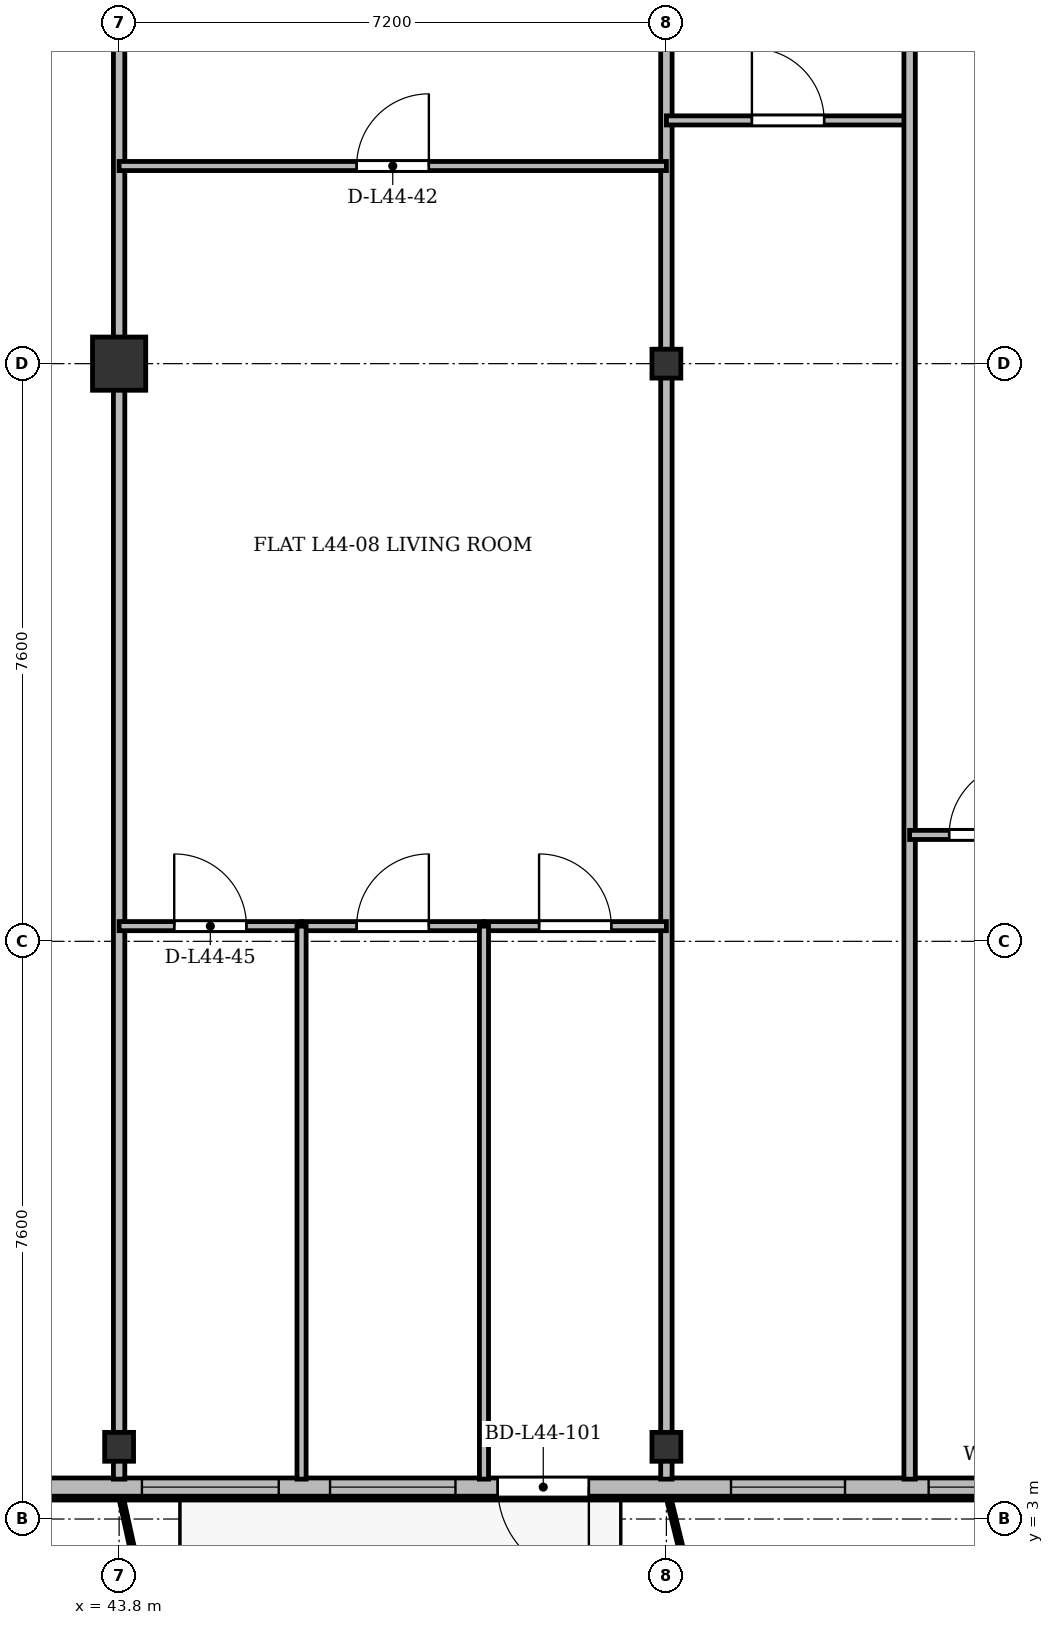
"""IFC4 building model, lengths in metres.
Left out: names, types, materials, properties, quantities, classifications, styles, units other than length and angle.
Written with IfcOpenShell. Run it as: python <this file> out.ifc"""

import sys

from ifc_helpers import new_model, si_unit, direction, frame, frame_2d, origin, origin_2d, place, context, subcontext, project, spatial, rectangle, i_section, extrude, source, transform, mapped, element, fill, save


model = new_model("IFC4")
c1 = context("Model", 3, precision=1e-05, world=origin(), true_north=direction((0.0, 1.0)))
c2 = subcontext(c1, "Body", "Model", "MODEL_VIEW")
j1 = project(units=[si_unit("LENGTHUNIT", "METRE"), si_unit("PLANEANGLEUNIT", "RADIAN")], contexts=[c1])
p1 = place(None, origin())
s1 = spatial("IfcSite", under=j1, at=p1, CompositionType="ELEMENT")
p2 = place(p1, origin())
s2 = spatial("IfcBuilding", under=s1, at=p2, CompositionType="ELEMENT")
p3 = place(p2, frame((0.0, 0.0, 168.1)))
s3 = spatial("IfcBuildingStorey", under=s2, at=p3, CompositionType="ELEMENT", Elevation=168.1)
m1 = source(origin(), c2, "Body", "SweptSolid", [
    extrude(i_section(OverallWidth=0.38, OverallDepth=0.38, WebThickness=0.02, FlangeThickness=0.03, at=origin_2d()), origin(), (0.0, 0.0, 1.0), 3.6),
])
p4 = place(p3, frame((43.8, 3.95, 0.0), z_axis=(0.0, 0.0, 1.0), x_axis=(1.0, 0.0, 0.0)))
e1 = element("IfcColumn", 1, at=p4, inside=s3, PredefinedType="COLUMN", context=c2, shape_type="MappedRepresentation", body=[
    mapped(m1, transform((0.0, 0.0, 0.0), x_axis=(1.0, 0.0, 0.0), y_axis=(0.0, 1.0, 0.0), z_axis=(0.0, 0.0, 1.0), scale=1.0)),
])
m2 = source(origin(), c2, "Body", "SweptSolid", [
    extrude(rectangle(XDim=0.7, YDim=0.7, at=origin_2d()), origin(), (0.0, 0.0, 1.0), 3.6),
])
p5 = place(p3, frame((43.8, 18.2, 0.0), z_axis=(0.0, 0.0, 1.0), x_axis=(1.0, 0.0, 0.0)))
e2 = element("IfcColumn", 2, at=p5, inside=s3, PredefinedType="COLUMN", context=c2, shape_type="MappedRepresentation", body=[
    mapped(m2, transform((0.0, 0.0, 0.0), x_axis=(1.0, 0.0, 0.0), y_axis=(0.0, 1.0, 0.0), z_axis=(0.0, 0.0, 1.0), scale=1.0)),
])
for number, where, z_axis, x_axis in (
    (3, (51.0, 3.95, 0.0), (0.0, 0.0, 1.0), (1.0, 0.0, 0.0)),
    (4, (51.0, 18.2, 0.0), (0.0, 0.0, 1.0), (1.0, 0.0, 0.0)),
):
    element("IfcColumn", number, at=place(p3, frame(where, z_axis=z_axis, x_axis=x_axis)), inside=s3, PredefinedType="COLUMN", context=c2, shape_type="MappedRepresentation", body=[
        mapped(m1, transform((0.0, 0.0, 0.0), x_axis=(1.0, 0.0, 0.0), y_axis=(0.0, 1.0, 0.0), z_axis=(0.0, 0.0, 1.0), scale=1.0)),
    ])
p6 = place(p3, frame((63.6, 3.42, 0.0), z_axis=(0.0, 0.0, 1.0), x_axis=(-1.0, 0.0, 0.0)))
e5 = element("IfcWall", 5, at=p6, inside=s3, PredefinedType="SOLIDWALL", context=c2, shape_type="SweptSolid", body=[
    extrude(rectangle(XDim=52.8, YDim=0.24, at=frame_2d((26.4, 0.0))), origin(), (0.0, 0.0, 1.0), 3.35),
])
p7 = place(p6, frame((1.62, 0.0, 0.9)))
e6 = element("IfcOpeningElement", 6, at=p7, cuts=e5, PredefinedType="OPENING", context=c2, shape_type="SweptSolid", body=[
    extrude(rectangle(XDim=1.65, YDim=1.85, at=frame_2d((0.825, 0.925))), frame((0.0, 0.13, 0.0), z_axis=(0.0, -1.0, 0.0), x_axis=(1.0, 0.0, 0.0)), (0.0, 0.0, 1.0), 0.26),
])
p8 = place(p6, frame((5.2, 0.0, 0.9)))
e7 = element("IfcOpeningElement", 7, at=p8, cuts=e5, PredefinedType="OPENING", context=c2, shape_type="SweptSolid", body=[
    extrude(rectangle(XDim=1.8, YDim=1.8, at=frame_2d((0.9, 0.9))), frame((0.0, 0.13, 0.0), z_axis=(0.0, -1.0, 0.0), x_axis=(1.0, 0.0, 0.0)), (0.0, 0.0, 1.0), 0.26),
])
p9 = place(p6, frame((7.65, 0.0, 0.9)))
e8 = element("IfcOpeningElement", 8, at=p9, cuts=e5, PredefinedType="OPENING", context=c2, shape_type="SweptSolid", body=[
    extrude(rectangle(XDim=1.5, YDim=1.75, at=frame_2d((0.75, 0.875))), frame((0.0, 0.13, 0.0), z_axis=(0.0, -1.0, 0.0), x_axis=(1.0, 0.0, 0.0)), (0.0, 0.0, 1.0), 0.26),
])
p10 = place(p6, frame((10.25, 0.0, 0.9)))
e9 = element("IfcOpeningElement", 9, at=p10, cuts=e5, PredefinedType="OPENING", context=c2, shape_type="SweptSolid", body=[
    extrude(rectangle(XDim=1.5, YDim=1.75, at=frame_2d((0.75, 0.875))), frame((0.0, 0.13, 0.0), z_axis=(0.0, -1.0, 0.0), x_axis=(1.0, 0.0, 0.0)), (0.0, 0.0, 1.0), 0.26),
])
p11 = place(p6, frame((13.62, 0.0, 0.0)))
e10 = element("IfcOpeningElement", 10, at=p11, cuts=e5, PredefinedType="OPENING", context=c2, shape_type="SweptSolid", body=[
    extrude(rectangle(XDim=1.2, YDim=2.2, at=frame_2d((0.6, 1.1))), frame((0.0, 0.13, 0.0), z_axis=(0.0, -1.0, 0.0), x_axis=(1.0, 0.0, 0.0)), (0.0, 0.0, 1.0), 0.26),
])
p12 = place(p6, frame((15.375, 0.0, 0.9)))
e11 = element("IfcOpeningElement", 11, at=p12, cuts=e5, PredefinedType="OPENING", context=c2, shape_type="SweptSolid", body=[
    extrude(rectangle(XDim=1.65, YDim=1.85, at=frame_2d((0.825, 0.925))), frame((0.0, 0.13, 0.0), z_axis=(0.0, -1.0, 0.0), x_axis=(1.0, 0.0, 0.0)), (0.0, 0.0, 1.0), 0.26),
])
p13 = place(p6, frame((17.7, 0.0, 0.9)))
e12 = element("IfcOpeningElement", 12, at=p13, cuts=e5, PredefinedType="OPENING", context=c2, shape_type="SweptSolid", body=[
    extrude(rectangle(XDim=1.8, YDim=1.8, at=frame_2d((0.9, 0.9))), frame((0.0, 0.13, 0.0), z_axis=(0.0, -1.0, 0.0), x_axis=(1.0, 0.0, 0.0)), (0.0, 0.0, 1.0), 0.26),
])
p14 = place(p6, frame((22.0, 0.0, 0.9)))
e13 = element("IfcOpeningElement", 13, at=p14, cuts=e5, PredefinedType="OPENING", context=c2, shape_type="SweptSolid", body=[
    extrude(rectangle(XDim=2.2, YDim=1.8, at=frame_2d((1.1, 0.9))), frame((0.0, 0.13, 0.0), z_axis=(0.0, -1.0, 0.0), x_axis=(1.0, 0.0, 0.0)), (0.0, 0.0, 1.0), 0.26),
])
p15 = place(p6, frame((28.95, 0.0, 0.9)))
e14 = element("IfcOpeningElement", 14, at=p15, cuts=e5, PredefinedType="OPENING", context=c2, shape_type="SweptSolid", body=[
    extrude(rectangle(XDim=1.5, YDim=1.75, at=frame_2d((0.75, 0.875))), frame((0.0, 0.13, 0.0), z_axis=(0.0, -1.0, 0.0), x_axis=(1.0, 0.0, 0.0)), (0.0, 0.0, 1.0), 0.26),
])
p16 = place(p6, frame((35.6, 0.0, 0.9)))
e15 = element("IfcOpeningElement", 15, at=p16, cuts=e5, PredefinedType="OPENING", context=c2, shape_type="SweptSolid", body=[
    extrude(rectangle(XDim=2.0, YDim=1.95, at=frame_2d((1.0, 0.975))), frame((0.0, 0.13, 0.0), z_axis=(0.0, -1.0, 0.0), x_axis=(1.0, 0.0, 0.0)), (0.0, 0.0, 1.0), 0.26),
])
p17 = place(p6, frame((41.656, 0.0, 0.0)))
e16 = element("IfcOpeningElement", 16, at=p17, cuts=e5, PredefinedType="OPENING", context=c2, shape_type="SweptSolid", body=[
    extrude(rectangle(XDim=1.2, YDim=2.2, at=frame_2d((0.6, 1.1))), frame((0.0, 0.13, 0.0), z_axis=(0.0, -1.0, 0.0), x_axis=(1.0, 0.0, 0.0)), (0.0, 0.0, 1.0), 0.26),
])
p18 = place(p6, frame((43.65, 0.0, 0.9)))
e17 = element("IfcOpeningElement", 17, at=p18, cuts=e5, PredefinedType="OPENING", context=c2, shape_type="SweptSolid", body=[
    extrude(rectangle(XDim=1.5, YDim=1.75, at=frame_2d((0.75, 0.875))), frame((0.0, 0.13, 0.0), z_axis=(0.0, -1.0, 0.0), x_axis=(1.0, 0.0, 0.0)), (0.0, 0.0, 1.0), 0.26),
])
p19 = place(p6, frame((45.95, 0.0, 0.9)))
e18 = element("IfcOpeningElement", 18, at=p19, cuts=e5, PredefinedType="OPENING", context=c2, shape_type="SweptSolid", body=[
    extrude(rectangle(XDim=1.5, YDim=1.75, at=frame_2d((0.75, 0.875))), frame((0.0, 0.13, 0.0), z_axis=(0.0, -1.0, 0.0), x_axis=(1.0, 0.0, 0.0)), (0.0, 0.0, 1.0), 0.26),
])
p20 = place(p6, frame((49.605, 0.0, 0.9)))
e19 = element("IfcOpeningElement", 19, at=p20, cuts=e5, PredefinedType="OPENING", context=c2, shape_type="SweptSolid", body=[
    extrude(rectangle(XDim=1.5, YDim=1.75, at=frame_2d((0.75, 0.875))), frame((0.0, 0.13, 0.0), z_axis=(0.0, -1.0, 0.0), x_axis=(1.0, 0.0, 0.0)), (0.0, 0.0, 1.0), 0.26),
])
for number, where, z_axis, x_axis in (
    (20, (43.8, 3.525, 0.0), (0.0, 0.0, 1.0), (0.0, 1.0, 0.0)),
    (21, (51.0, 3.525, 0.0), (0.0, 0.0, 1.0), (0.0, 1.0, 0.0)),
):
    element("IfcWall", number, at=place(p3, frame(where, z_axis=z_axis, x_axis=x_axis)), inside=s3, PredefinedType="PARTITIONING", context=c2, shape_type="SweptSolid", body=[
        extrude(rectangle(XDim=27.275, YDim=0.15, at=frame_2d((13.638, 0.0))), origin(), (0.0, 0.0, 1.0), 2.85),
    ])
p21 = place(p3, frame((43.8, 20.8, 0.0), z_axis=(0.0, 0.0, 1.0), x_axis=(1.0, 0.0, 0.0)))
e22 = element("IfcWall", 22, at=p21, inside=s3, PredefinedType="PARTITIONING", context=c2, shape_type="SweptSolid", body=[
    extrude(rectangle(XDim=7.2, YDim=0.12, at=frame_2d((3.6, 0.0))), origin(), (0.0, 0.0, 1.0), 2.85),
])
p22 = place(p21, frame((3.125, 0.0, 0.0)))
e23 = element("IfcOpeningElement", 23, at=p22, cuts=e22, PredefinedType="OPENING", context=c2, shape_type="SweptSolid", body=[
    extrude(rectangle(XDim=0.95, YDim=2.15, at=frame_2d((0.475, 1.075))), frame((0.0, 0.07, 0.0), z_axis=(0.0, -1.0, 0.0), x_axis=(1.0, 0.0, 0.0)), (0.0, 0.0, 1.0), 0.14),
])
p23 = place(p3, frame((43.8, 10.8, 0.0), z_axis=(0.0, 0.0, 1.0), x_axis=(1.0, 0.0, 0.0)))
e24 = element("IfcWall", 24, at=p23, inside=s3, PredefinedType="PARTITIONING", context=c2, shape_type="SweptSolid", body=[
    extrude(rectangle(XDim=2.4, YDim=0.12, at=frame_2d((1.2, 0.0))), origin(), (0.0, 0.0, 1.0), 2.85),
])
p24 = place(p23, frame((0.725, 0.0, 0.0)))
e25 = element("IfcOpeningElement", 25, at=p24, cuts=e24, PredefinedType="OPENING", context=c2, shape_type="SweptSolid", body=[
    extrude(rectangle(XDim=0.95, YDim=2.15, at=frame_2d((0.475, 1.075))), frame((0.0, 0.07, 0.0), z_axis=(0.0, -1.0, 0.0), x_axis=(1.0, 0.0, 0.0)), (0.0, 0.0, 1.0), 0.14),
])
p25 = place(p3, frame((46.2, 10.8, 0.0), z_axis=(0.0, 0.0, 1.0), x_axis=(1.0, 0.0, 0.0)))
e26 = element("IfcWall", 26, at=p25, inside=s3, PredefinedType="PARTITIONING", context=c2, shape_type="SweptSolid", body=[
    extrude(rectangle(XDim=2.4, YDim=0.12, at=frame_2d((1.2, 0.0))), origin(), (0.0, 0.0, 1.0), 3.0),
])
p26 = place(p25, frame((0.725, 0.0, 0.0)))
e27 = element("IfcOpeningElement", 27, at=p26, cuts=e26, PredefinedType="OPENING", context=c2, shape_type="SweptSolid", body=[
    extrude(rectangle(XDim=0.95, YDim=2.15, at=frame_2d((0.475, 1.075))), frame((0.0, 0.07, 0.0), z_axis=(0.0, -1.0, 0.0), x_axis=(1.0, 0.0, 0.0)), (0.0, 0.0, 1.0), 0.14),
])
p27 = place(p3, frame((46.2, 3.525, 0.0), z_axis=(0.0, 0.0, 1.0), x_axis=(0.0, 1.0, 0.0)))
e28 = element("IfcWall", 28, at=p27, inside=s3, PredefinedType="PARTITIONING", context=c2, shape_type="SweptSolid", body=[
    extrude(rectangle(XDim=7.275, YDim=0.12, at=frame_2d((3.638, 0.0))), origin(), (0.0, 0.0, 1.0), 2.75),
])
p28 = place(p3, frame((48.6, 10.8, 0.0), z_axis=(0.0, 0.0, 1.0), x_axis=(1.0, 0.0, 0.0)))
e29 = element("IfcWall", 29, at=p28, inside=s3, PredefinedType="PARTITIONING", context=c2, shape_type="SweptSolid", body=[
    extrude(rectangle(XDim=2.4, YDim=0.12, at=frame_2d((1.2, 0.0))), origin(), (0.0, 0.0, 1.0), 2.85),
])
p29 = place(p28, frame((0.725, 0.0, 0.0)))
e30 = element("IfcOpeningElement", 30, at=p29, cuts=e29, PredefinedType="OPENING", context=c2, shape_type="SweptSolid", body=[
    extrude(rectangle(XDim=0.95, YDim=2.15, at=frame_2d((0.475, 1.075))), frame((0.0, 0.07, 0.0), z_axis=(0.0, -1.0, 0.0), x_axis=(1.0, 0.0, 0.0)), (0.0, 0.0, 1.0), 0.14),
])
p30 = place(p3, frame((48.6, 3.525, 0.0), z_axis=(0.0, 0.0, 1.0), x_axis=(0.0, 1.0, 0.0)))
e31 = element("IfcWall", 31, at=p30, inside=s3, PredefinedType="PARTITIONING", context=c2, shape_type="SweptSolid", body=[
    extrude(rectangle(XDim=7.275, YDim=0.12, at=frame_2d((3.638, 0.0))), origin(), (0.0, 0.0, 1.0), 2.75),
])
p31 = place(p3, frame((51.0, 21.4, 0.0), z_axis=(0.0, 0.0, 1.0), x_axis=(1.0, 0.0, 0.0)))
e32 = element("IfcWall", 32, at=p31, inside=s3, PredefinedType="PARTITIONING", context=c2, shape_type="SweptSolid", body=[
    extrude(rectangle(XDim=3.2, YDim=0.12, at=frame_2d((1.6, 0.0))), origin(), (0.0, 0.0, 1.0), 2.85),
])
p32 = place(p31, frame((1.125, 0.0, 0.0)))
e33 = element("IfcOpeningElement", 33, at=p32, cuts=e32, PredefinedType="OPENING", context=c2, shape_type="SweptSolid", body=[
    extrude(rectangle(XDim=0.95, YDim=2.15, at=frame_2d((0.475, 1.075))), frame((0.0, 0.07, 0.0), z_axis=(0.0, -1.0, 0.0), x_axis=(1.0, 0.0, 0.0)), (0.0, 0.0, 1.0), 0.14),
])
p33 = place(p3, frame((54.2, 3.525, 0.0), z_axis=(0.0, 0.0, 1.0), x_axis=(0.0, 1.0, 0.0)))
e34 = element("IfcWall", 34, at=p33, inside=s3, PredefinedType="PARTITIONING", context=c2, shape_type="SweptSolid", body=[
    extrude(rectangle(XDim=27.275, YDim=0.15, at=frame_2d((13.638, 0.0))), origin(), (0.0, 0.0, 1.0), 2.75),
])
p34 = place(p3, frame((54.2, 12.0, 0.0), z_axis=(0.0, 0.0, 1.0), x_axis=(1.0, 0.0, 0.0)))
e35 = element("IfcWall", 35, at=p34, inside=s3, PredefinedType="PARTITIONING", context=c2, shape_type="SweptSolid", body=[
    extrude(rectangle(XDim=2.0, YDim=0.12, at=frame_2d((1.0, 0.0))), origin(), (0.0, 0.0, 1.0), 3.35),
])
p35 = place(p34, frame((0.52, 0.0, 0.0)))
e36 = element("IfcOpeningElement", 36, at=p35, cuts=e35, PredefinedType="OPENING", context=c2, shape_type="SweptSolid", body=[
    extrude(rectangle(XDim=0.95, YDim=2.15, at=frame_2d((0.475, 1.075))), frame((0.0, 0.07, 0.0), z_axis=(0.0, -1.0, 0.0), x_axis=(1.0, 0.0, 0.0)), (0.0, 0.0, 1.0), 0.14),
])
m3 = source(origin(), c2, "Body", "SweptSolid", [
    extrude(rectangle(XDim=1.5, YDim=1.75, at=frame_2d((0.75, 0.875))), frame((0.0, 0.03, 0.0), z_axis=(0.0, -1.0, 0.0), x_axis=(1.0, 0.0, 0.0)), (0.0, 0.0, 1.0), 0.06),
])
p36 = place(p9, origin())
e37 = element("IfcWindow", 37, at=p36, inside=s3, PartitioningType="SINGLE_PANEL", PredefinedType="WINDOW", context=c2, shape_type="MappedRepresentation", body=[
    mapped(m3, transform((0.0, 0.0, 0.0), x_axis=(1.0, 0.0, 0.0), y_axis=(0.0, 1.0, 0.0), z_axis=(0.0, 0.0, 1.0), scale=1.0)),
])
fill(e8, e37)
p37 = place(p10, origin())
e38 = element("IfcWindow", 38, at=p37, inside=s3, PartitioningType="SINGLE_PANEL", PredefinedType="WINDOW", context=c2, shape_type="MappedRepresentation", body=[
    mapped(m3, transform((0.0, 0.0, 0.0), x_axis=(1.0, 0.0, 0.0), y_axis=(0.0, 1.0, 0.0), z_axis=(0.0, 0.0, 1.0), scale=1.0)),
])
fill(e9, e38)
m4 = source(origin(), c2, "Body", "SweptSolid", [
    extrude(rectangle(XDim=1.2, YDim=2.2, at=frame_2d((0.6, 1.1))), frame((0.0, 0.025, 0.0), z_axis=(0.0, -1.0, 0.0), x_axis=(1.0, 0.0, 0.0)), (0.0, 0.0, 1.0), 0.05),
])
p38 = place(p11, origin())
e39 = element("IfcDoor", 39, at=p38, inside=s3, OperationType="SINGLE_SWING_LEFT", PredefinedType="DOOR", context=c2, shape_type="MappedRepresentation", body=[
    mapped(m4, transform((0.0, 0.0, 0.0), x_axis=(1.0, 0.0, 0.0), y_axis=(0.0, 1.0, 0.0), z_axis=(0.0, 0.0, 1.0), scale=1.0)),
])
fill(e10, e39)
m5 = source(origin(), c2, "Body", "SweptSolid", [
    extrude(rectangle(XDim=1.65, YDim=1.85, at=frame_2d((0.825, 0.925))), frame((0.0, 0.03, 0.0), z_axis=(0.0, -1.0, 0.0), x_axis=(1.0, 0.0, 0.0)), (0.0, 0.0, 1.0), 0.06),
])
p39 = place(p12, origin())
e40 = element("IfcWindow", 40, at=p39, inside=s3, PartitioningType="SINGLE_PANEL", PredefinedType="WINDOW", context=c2, shape_type="MappedRepresentation", body=[
    mapped(m5, transform((0.0, 0.0, 0.0), x_axis=(1.0, 0.0, 0.0), y_axis=(0.0, 1.0, 0.0), z_axis=(0.0, 0.0, 1.0), scale=1.0)),
])
fill(e11, e40)
m6 = source(origin(), c2, "Body", "SweptSolid", [
    extrude(rectangle(XDim=1.8, YDim=1.8, at=frame_2d((0.9, 0.9))), frame((0.0, 0.03, 0.0), z_axis=(0.0, -1.0, 0.0), x_axis=(1.0, 0.0, 0.0)), (0.0, 0.0, 1.0), 0.06),
])
p40 = place(p13, origin())
e41 = element("IfcWindow", 41, at=p40, inside=s3, PartitioningType="SINGLE_PANEL", PredefinedType="WINDOW", context=c2, shape_type="MappedRepresentation", body=[
    mapped(m6, transform((0.0, 0.0, 0.0), x_axis=(1.0, 0.0, 0.0), y_axis=(0.0, 1.0, 0.0), z_axis=(0.0, 0.0, 1.0), scale=1.0)),
])
fill(e12, e41)
m7 = source(origin(), c2, "Body", "SweptSolid", [
    extrude(rectangle(XDim=0.95, YDim=2.15, at=frame_2d((0.475, 1.075))), frame((0.0, 0.025, 0.0), z_axis=(0.0, -1.0, 0.0), x_axis=(1.0, 0.0, 0.0)), (0.0, 0.0, 1.0), 0.05),
])
p41 = place(p22, origin())
e42 = element("IfcDoor", 42, at=p41, inside=s3, OperationType="SINGLE_SWING_RIGHT", PredefinedType="DOOR", context=c2, shape_type="MappedRepresentation", body=[
    mapped(m7, transform((0.0, 0.0, 0.0), x_axis=(1.0, 0.0, 0.0), y_axis=(0.0, 1.0, 0.0), z_axis=(0.0, 0.0, 1.0), scale=1.0)),
])
fill(e23, e42)
p42 = place(p24, origin())
e43 = element("IfcDoor", 43, at=p42, inside=s3, OperationType="SINGLE_SWING_LEFT", PredefinedType="DOOR", context=c2, shape_type="MappedRepresentation", body=[
    mapped(m7, transform((0.0, 0.0, 0.0), x_axis=(1.0, 0.0, 0.0), y_axis=(0.0, 1.0, 0.0), z_axis=(0.0, 0.0, 1.0), scale=1.0)),
])
fill(e25, e43)
p43 = place(p26, origin())
e44 = element("IfcDoor", 44, at=p43, inside=s3, OperationType="SINGLE_SWING_RIGHT", PredefinedType="DOOR", context=c2, shape_type="MappedRepresentation", body=[
    mapped(m7, transform((0.0, 0.0, 0.0), x_axis=(1.0, 0.0, 0.0), y_axis=(0.0, 1.0, 0.0), z_axis=(0.0, 0.0, 1.0), scale=1.0)),
])
fill(e27, e44)
p44 = place(p29, origin())
e45 = element("IfcDoor", 45, at=p44, inside=s3, OperationType="SINGLE_SWING_LEFT", PredefinedType="DOOR", context=c2, shape_type="MappedRepresentation", body=[
    mapped(m7, transform((0.0, 0.0, 0.0), x_axis=(1.0, 0.0, 0.0), y_axis=(0.0, 1.0, 0.0), z_axis=(0.0, 0.0, 1.0), scale=1.0)),
])
fill(e30, e45)
p45 = place(p32, origin())
e46 = element("IfcDoor", 46, at=p45, inside=s3, OperationType="SINGLE_SWING_LEFT", PredefinedType="DOOR", context=c2, shape_type="MappedRepresentation", body=[
    mapped(m7, transform((0.0, 0.0, 0.0), x_axis=(1.0, 0.0, 0.0), y_axis=(0.0, 1.0, 0.0), z_axis=(0.0, 0.0, 1.0), scale=1.0)),
])
fill(e33, e46)
p46 = place(p35, origin())
e47 = element("IfcDoor", 47, at=p46, inside=s3, OperationType="SINGLE_SWING_RIGHT", PredefinedType="DOOR", context=c2, shape_type="MappedRepresentation", body=[
    mapped(m7, transform((0.0, 0.0, 0.0), x_axis=(1.0, 0.0, 0.0), y_axis=(0.0, 1.0, 0.0), z_axis=(0.0, 0.0, 1.0), scale=1.0)),
])
fill(e36, e47)
save(model, sys.argv[1])
